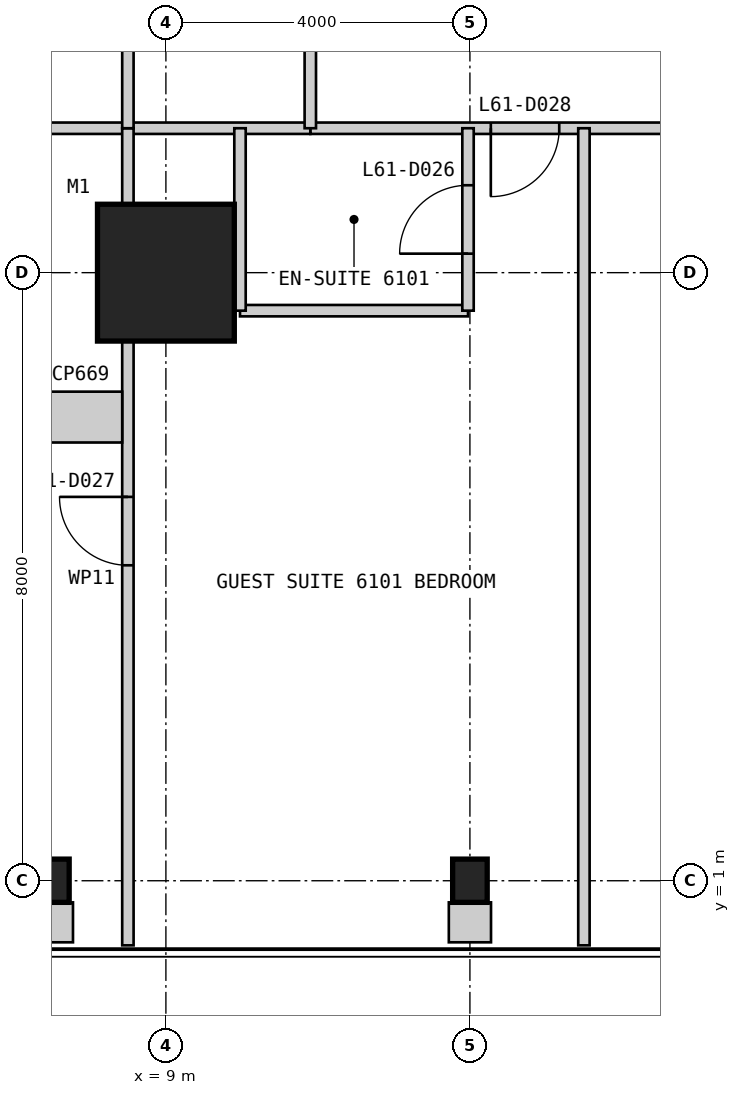
"""IFC4 building model, lengths in metres.
Left out: names, types, materials, properties, quantities, classifications, styles, units other than length and angle.
Written with IfcOpenShell. Run it as: python <this file> out.ifc"""

import sys

from ifc_helpers import new_model, si_unit, direction, frame, frame_2d, origin, origin_2d, place, context, subcontext, project, spatial, rectangle, i_section, extrude, element, fill, save


model = new_model("IFC4")
c1 = context("Model", 3, precision=1e-05, world=origin(), true_north=direction((0.0, 1.0)))
c2 = subcontext(c1, "Body", "Model", "MODEL_VIEW")
j1 = project(units=[si_unit("LENGTHUNIT", "METRE"), si_unit("PLANEANGLEUNIT", "RADIAN")], contexts=[c1])
p1 = place(None, origin())
s1 = spatial("IfcSite", under=j1, at=p1, CompositionType="ELEMENT")
p2 = place(p1, origin())
s2 = spatial("IfcBuilding", under=s1, at=p2, CompositionType="ELEMENT")
p3 = place(p2, frame((0.0, 0.0, 259.4)))
s3 = spatial("IfcBuildingStorey", under=s2, at=p3, CompositionType="ELEMENT", Elevation=259.4)
p4 = place(p3, frame((9.0, 9.0, 0.0), z_axis=(0.0, 0.0, 1.0), x_axis=(1.0, 0.0, 0.0)))
e1 = element("IfcColumn", 1, at=p4, inside=s3, PredefinedType="COLUMN", context=c2, shape_type="SweptSolid", body=[
    extrude(rectangle(XDim=1.8, YDim=1.8, at=origin_2d()), origin(), (0.0, 0.0, 1.0), 3.4),
])
for number, where, z_axis, x_axis in (
    (2, (7.5, 1.0, 0.0), (0.0, 0.0, 1.0), (1.0, 0.0, 0.0)),
    (3, (13.0, 1.0, 0.0), (0.0, 0.0, 1.0), (1.0, 0.0, 0.0)),
):
    element("IfcColumn", number, at=place(p3, frame(where, z_axis=z_axis, x_axis=x_axis)), inside=s3, PredefinedType="COLUMN", context=c2, shape_type="SweptSolid", body=[
        extrude(i_section(OverallWidth=0.455, OverallDepth=0.569, WebThickness=0.078, FlangeThickness=0.125, at=origin_2d()), origin(), (0.0, 0.0, 1.0), 3.4),
    ])
p5 = place(p3, frame((10.9, 10.9, 0.0), z_axis=(0.0, 0.0, 1.0), x_axis=(1.0, 0.0, 0.0)))
e4 = element("IfcWall", 4, at=p5, inside=s3, PredefinedType="PARTITIONING", context=c2, shape_type="SweptSolid", body=[
    extrude(rectangle(XDim=28.2, YDim=0.15, at=frame_2d((14.1, 0.0))), origin(), (0.0, 0.0, 1.0), 3.25),
])
p6 = place(p5, frame((2.375, 0.0, 0.0)))
e5 = element("IfcOpeningElement", 5, at=p6, cuts=e4, PredefinedType="OPENING", context=c2, shape_type="SweptSolid", body=[
    extrude(rectangle(XDim=0.9, YDim=2.1, at=frame_2d((0.45, 1.05))), frame((0.0, 0.085, 0.0), z_axis=(0.0, -1.0, 0.0), x_axis=(1.0, 0.0, 0.0)), (0.0, 0.0, 1.0), 0.17),
])
p7 = place(p5, frame((10.7, 0.0, 0.0)))
e6 = element("IfcOpeningElement", 6, at=p7, cuts=e4, PredefinedType="OPENING", context=c2, shape_type="SweptSolid", body=[
    extrude(rectangle(XDim=0.9, YDim=2.1, at=frame_2d((0.45, 1.05))), frame((0.0, 0.085, 0.0), z_axis=(0.0, -1.0, 0.0), x_axis=(1.0, 0.0, 0.0)), (0.0, 0.0, 1.0), 0.17),
])
p8 = place(p5, frame((16.8, 0.0, 0.0)))
e7 = element("IfcOpeningElement", 7, at=p8, cuts=e4, PredefinedType="OPENING", context=c2, shape_type="SweptSolid", body=[
    extrude(rectangle(XDim=1.0, YDim=2.1, at=frame_2d((0.5, 1.05))), frame((0.0, 0.085, 0.0), z_axis=(0.0, -1.0, 0.0), x_axis=(1.0, 0.0, 0.0)), (0.0, 0.0, 1.0), 0.17),
])
p9 = place(p5, frame((23.7, 0.0, 0.0)))
e8 = element("IfcOpeningElement", 8, at=p9, cuts=e4, PredefinedType="OPENING", context=c2, shape_type="SweptSolid", body=[
    extrude(rectangle(XDim=0.9, YDim=2.1, at=frame_2d((0.45, 1.05))), frame((0.0, 0.085, 0.0), z_axis=(0.0, -1.0, 0.0), x_axis=(1.0, 0.0, 0.0)), (0.0, 0.0, 1.0), 0.17),
])
p10 = place(p3, frame((0.15, 10.9, 0.0), z_axis=(0.0, 0.0, 1.0), x_axis=(1.0, 0.0, 0.0)))
e9 = element("IfcWall", 9, at=p10, inside=s3, PredefinedType="PARTITIONING", context=c2, shape_type="SweptSolid", body=[
    extrude(rectangle(XDim=10.75, YDim=0.15, at=frame_2d((5.375, 0.0))), origin(), (0.0, 0.0, 1.0), 3.25),
])
p11 = place(p3, frame((9.975, 8.5, 0.0), z_axis=(0.0, 0.0, 1.0), x_axis=(1.0, 0.0, 0.0)))
e10 = element("IfcWall", 10, at=p11, inside=s3, PredefinedType="PARTITIONING", context=c2, shape_type="SweptSolid", body=[
    extrude(rectangle(XDim=3.0, YDim=0.15, at=frame_2d((1.5, 0.0))), origin(), (0.0, 0.0, 1.0), 3.25),
])
p12 = place(p3, frame((12.975, 8.5, 0.0), z_axis=(0.0, 0.0, 1.0), x_axis=(0.0, 1.0, 0.0)))
e11 = element("IfcWall", 11, at=p12, inside=s3, PredefinedType="PARTITIONING", context=c2, shape_type="SweptSolid", body=[
    extrude(rectangle(XDim=2.4, YDim=0.15, at=frame_2d((1.2, 0.0))), origin(), (0.0, 0.0, 1.0), 2.628),
])
p13 = place(p12, frame((0.75, 0.0, 0.0)))
e12 = element("IfcOpeningElement", 12, at=p13, cuts=e11, PredefinedType="OPENING", context=c2, shape_type="SweptSolid", body=[
    extrude(rectangle(XDim=0.9, YDim=2.1, at=frame_2d((0.45, 1.05))), frame((0.0, 0.085, 0.0), z_axis=(0.0, -1.0, 0.0), x_axis=(1.0, 0.0, 0.0)), (0.0, 0.0, 1.0), 0.17),
])
p14 = place(p3, frame((9.975, 8.5, 0.0), z_axis=(0.0, 0.0, 1.0), x_axis=(0.0, 1.0, 0.0)))
e13 = element("IfcWall", 13, at=p14, inside=s3, PredefinedType="PARTITIONING", context=c2, shape_type="SweptSolid", body=[
    extrude(rectangle(XDim=2.4, YDim=0.15, at=frame_2d((1.2, 0.0))), origin(), (0.0, 0.0, 1.0), 3.25),
])
p15 = place(p3, frame((8.5, 0.15, 0.0), z_axis=(0.0, 0.0, 1.0), x_axis=(0.0, 1.0, 0.0)))
e14 = element("IfcWall", 14, at=p15, inside=s3, PredefinedType="PARTITIONING", context=c2, shape_type="SweptSolid", body=[
    extrude(rectangle(XDim=10.75, YDim=0.15, at=frame_2d((5.375, 0.0))), origin(), (0.0, 0.0, 1.0), 3.25),
])
p16 = place(p15, frame((5.0, 0.0, 0.0)))
e15 = element("IfcOpeningElement", 15, at=p16, cuts=e14, PredefinedType="OPENING", context=c2, shape_type="SweptSolid", body=[
    extrude(rectangle(XDim=0.9, YDim=2.1, at=frame_2d((0.45, 1.05))), frame((0.0, 0.085, 0.0), z_axis=(0.0, -1.0, 0.0), x_axis=(1.0, 0.0, 0.0)), (0.0, 0.0, 1.0), 0.17),
])
p17 = place(p3, frame((14.5, 0.15, 0.0), z_axis=(0.0, 0.0, 1.0), x_axis=(0.0, 1.0, 0.0)))
e16 = element("IfcWall", 16, at=p17, inside=s3, PredefinedType="PARTITIONING", context=c2, shape_type="SweptSolid", body=[
    extrude(rectangle(XDim=10.75, YDim=0.15, at=frame_2d((5.375, 0.0))), origin(), (0.0, 0.0, 1.0), 3.25),
])
p18 = place(p3, frame((10.9, 39.1, 0.0), z_axis=(0.0, 0.0, 1.0), x_axis=(0.0, -1.0, 0.0)))
e17 = element("IfcWall", 17, at=p18, inside=s3, PredefinedType="PARTITIONING", context=c2, shape_type="SweptSolid", body=[
    extrude(rectangle(XDim=28.2, YDim=0.15, at=frame_2d((14.1, 0.0))), origin(), (0.0, 0.0, 1.0), 3.25),
])
p19 = place(p18, frame((2.375, 0.0, 0.0)))
e18 = element("IfcOpeningElement", 18, at=p19, cuts=e17, PredefinedType="OPENING", context=c2, shape_type="SweptSolid", body=[
    extrude(rectangle(XDim=0.9, YDim=2.1, at=frame_2d((0.45, 1.05))), frame((0.0, 0.085, 0.0), z_axis=(0.0, -1.0, 0.0), x_axis=(1.0, 0.0, 0.0)), (0.0, 0.0, 1.0), 0.17),
])
p20 = place(p18, frame((10.7, 0.0, 0.0)))
e19 = element("IfcOpeningElement", 19, at=p20, cuts=e17, PredefinedType="OPENING", context=c2, shape_type="SweptSolid", body=[
    extrude(rectangle(XDim=0.9, YDim=2.1, at=frame_2d((0.45, 1.05))), frame((0.0, 0.085, 0.0), z_axis=(0.0, -1.0, 0.0), x_axis=(1.0, 0.0, 0.0)), (0.0, 0.0, 1.0), 0.17),
])
p21 = place(p18, frame((17.1, 0.0, 0.0)))
e20 = element("IfcOpeningElement", 20, at=p21, cuts=e17, PredefinedType="OPENING", context=c2, shape_type="SweptSolid", body=[
    extrude(rectangle(XDim=0.9, YDim=2.1, at=frame_2d((0.45, 1.05))), frame((0.0, 0.085, 0.0), z_axis=(0.0, -1.0, 0.0), x_axis=(1.0, 0.0, 0.0)), (0.0, 0.0, 1.0), 0.17),
])
p22 = place(p18, frame((23.7, 0.0, 0.0)))
e21 = element("IfcOpeningElement", 21, at=p22, cuts=e17, PredefinedType="OPENING", context=c2, shape_type="SweptSolid", body=[
    extrude(rectangle(XDim=0.9, YDim=2.1, at=frame_2d((0.45, 1.05))), frame((0.0, 0.085, 0.0), z_axis=(0.0, -1.0, 0.0), x_axis=(1.0, 0.0, 0.0)), (0.0, 0.0, 1.0), 0.17),
])
p23 = place(p3, frame((8.5, 13.9, 0.0), z_axis=(0.0, 0.0, 1.0), x_axis=(0.0, -1.0, 0.0)))
e22 = element("IfcWall", 22, at=p23, inside=s3, PredefinedType="PARTITIONING", context=c2, shape_type="SweptSolid", body=[
    extrude(rectangle(XDim=3.0, YDim=0.15, at=frame_2d((1.5, 0.0))), origin(), (0.0, 0.0, 1.0), 3.25),
])
p24 = place(p3, frame((7.5, 0.19, 0.0), z_axis=(0.0, 0.0, 1.0), x_axis=(0.0, 1.0, 0.0)))
e23 = element("IfcWall", 23, at=p24, inside=s3, PredefinedType="PARTITIONING", context=c2, shape_type="SweptSolid", body=[
    extrude(rectangle(XDim=0.526, YDim=0.555, at=frame_2d((0.263, 0.0))), origin(), (0.0, 0.0, 1.0), 3.25),
])
p25 = place(p3, frame((8.425, 7.1, 0.0), z_axis=(0.0, 0.0, 1.0), x_axis=(-1.0, 0.0, 0.0)))
e24 = element("IfcWall", 24, at=p25, inside=s3, PredefinedType="PARTITIONING", context=c2, shape_type="SweptSolid", body=[
    extrude(rectangle(XDim=1.098, YDim=0.669, at=frame_2d((0.549, 0.0))), origin(), (0.0, 0.0, 1.0), 3.25),
])
p26 = place(p3, frame((13.0, 0.19, 0.0), z_axis=(0.0, 0.0, 1.0), x_axis=(0.0, 1.0, 0.0)))
e25 = element("IfcWall", 25, at=p26, inside=s3, PredefinedType="PARTITIONING", context=c2, shape_type="SweptSolid", body=[
    extrude(rectangle(XDim=0.526, YDim=0.555, at=frame_2d((0.263, 0.0))), origin(), (0.0, 0.0, 1.0), 3.25),
])
p27 = place(p13, origin())
e26 = element("IfcDoor", 26, at=p27, inside=s3, OperationType="SINGLE_SWING_LEFT", PredefinedType="DOOR", context=c2, shape_type="SweptSolid", body=[
    extrude(rectangle(XDim=0.9, YDim=2.1, at=frame_2d((0.45, 1.05))), frame((0.0, 0.025, 0.0), z_axis=(0.0, -1.0, 0.0), x_axis=(1.0, 0.0, 0.0)), (0.0, 0.0, 1.0), 0.05),
])
fill(e12, e26)
p28 = place(p16, origin())
e27 = element("IfcDoor", 27, at=p28, inside=s3, OperationType="SINGLE_SWING_RIGHT", PredefinedType="DOOR", context=c2, shape_type="SweptSolid", body=[
    extrude(rectangle(XDim=0.9, YDim=2.1, at=frame_2d((0.45, 1.05))), frame((0.0, 0.025, 0.0), z_axis=(0.0, -1.0, 0.0), x_axis=(1.0, 0.0, 0.0)), (0.0, 0.0, 1.0), 0.05),
])
fill(e15, e27)
p29 = place(p6, frame((0.9, 0.0, 0.0), z_axis=(0.0, 0.0, 1.0), x_axis=(-1.0, 0.0, 0.0)))
e28 = element("IfcDoor", 28, at=p29, inside=s3, OperationType="SINGLE_SWING_RIGHT", PredefinedType="DOOR", context=c2, shape_type="SweptSolid", body=[
    extrude(rectangle(XDim=0.9, YDim=2.1, at=frame_2d((0.45, 1.05))), frame((0.0, 0.025, 0.0), z_axis=(0.0, -1.0, 0.0), x_axis=(1.0, 0.0, 0.0)), (0.0, 0.0, 1.0), 0.05),
])
fill(e5, e28)
save(model, sys.argv[1])
